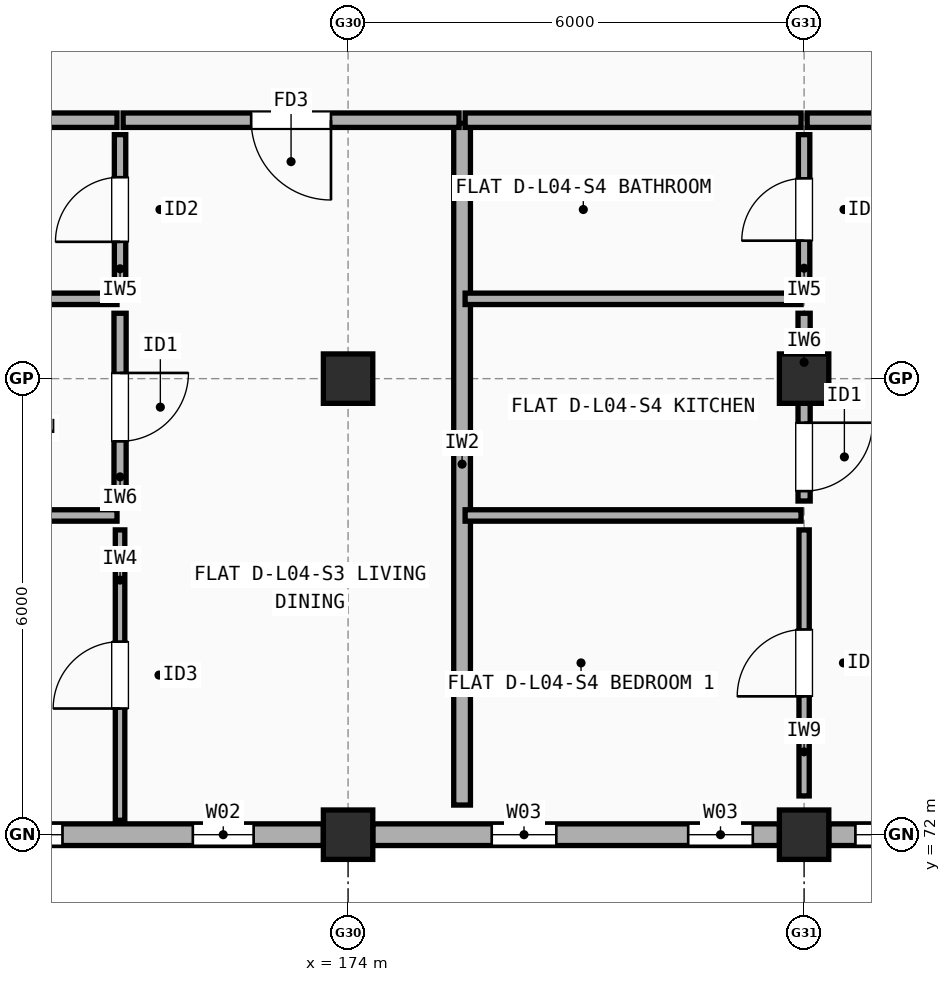
"""IFC4 building model, lengths in metres.
Left out: names, types, materials, properties, quantities, classifications, styles, units other than length and angle.
Written with IfcOpenShell. Run it as: python <this file> out.ifc"""

import sys

from ifc_helpers import new_model, si_unit, direction, frame, frame_2d, origin, origin_2d, place, context, subcontext, project, spatial, rectangle, extrude, element, fill, save


model = new_model("IFC4")
c1 = context("Model", 3, precision=1e-05, world=origin(), true_north=direction((0.0, 1.0)))
c2 = subcontext(c1, "Body", "Model", "MODEL_VIEW")
j1 = project(units=[si_unit("LENGTHUNIT", "METRE"), si_unit("PLANEANGLEUNIT", "RADIAN")], contexts=[c1])
p1 = place(None, origin())
s1 = spatial("IfcSite", under=j1, at=p1, CompositionType="ELEMENT")
p2 = place(p1, origin())
s2 = spatial("IfcBuilding", under=s1, at=p2, CompositionType="ELEMENT")
p3 = place(p2, frame((0.0, 0.0, 14.1)))
s3 = spatial("IfcBuildingStorey", under=s2, at=p3, CompositionType="ELEMENT", Elevation=14.1)
for number, where, z_axis, x_axis in (
    (1, (174.0, 72.0, 0.0), (0.0, 0.0, 1.0), (1.0, 0.0, 0.0)),
    (2, (174.0, 78.0, 0.0), (0.0, 0.0, 1.0), (1.0, 0.0, 0.0)),
    (3, (180.0, 72.0, 0.0), (0.0, 0.0, 1.0), (1.0, 0.0, 0.0)),
    (4, (180.0, 78.0, 0.0), (0.0, 0.0, 1.0), (1.0, 0.0, 0.0)),
):
    element("IfcColumn", number, at=place(p3, frame(where, z_axis=z_axis, x_axis=x_axis)), inside=s3, PredefinedType="COLUMN", context=c2, shape_type="SweptSolid", body=[
        extrude(rectangle(XDim=0.65, YDim=0.65, at=origin_2d()), origin(), (0.0, 0.0, 1.0), 2.95),
    ])
p4 = place(p3, frame((168.325, 72.0, 0.0), z_axis=(0.0, 0.0, 1.0), x_axis=(1.0, 0.0, 0.0)))
e5 = element("IfcWall", 5, at=p4, inside=s3, PredefinedType="STANDARD", context=c2, shape_type="SweptSolid", body=[
    extrude(rectangle(XDim=5.35, YDim=0.285, at=frame_2d((2.675, 0.0))), origin(), (0.0, 0.0, 1.0), 2.432),
])
p5 = place(p4, frame((0.718, 0.0, 0.9)))
e6 = element("IfcOpeningElement", 6, at=p5, cuts=e5, PredefinedType="OPENING", context=c2, shape_type="SweptSolid", body=[
    extrude(rectangle(XDim=1.2, YDim=1.35, at=frame_2d((0.6, 0.675))), frame((0.0, 0.152, 0.0), z_axis=(0.0, -1.0, 0.0), x_axis=(1.0, 0.0, 0.0)), (0.0, 0.0, 1.0), 0.305),
])
p6 = place(p4, frame((3.633, 0.0, 0.9)))
e7 = element("IfcOpeningElement", 7, at=p6, cuts=e5, PredefinedType="OPENING", context=c2, shape_type="SweptSolid", body=[
    extrude(rectangle(XDim=0.8, YDim=1.2, at=frame_2d((0.4, 0.6))), frame((0.0, 0.152, 0.0), z_axis=(0.0, -1.0, 0.0), x_axis=(1.0, 0.0, 0.0)), (0.0, 0.0, 1.0), 0.305),
])
p7 = place(p3, frame((174.325, 72.0, 0.0), z_axis=(0.0, 0.0, 1.0), x_axis=(1.0, 0.0, 0.0)))
e8 = element("IfcWall", 8, at=p7, inside=s3, PredefinedType="STANDARD", context=c2, shape_type="SweptSolid", body=[
    extrude(rectangle(XDim=5.35, YDim=0.285, at=frame_2d((2.675, 0.0))), origin(), (0.0, 0.0, 1.0), 2.432),
])
p8 = place(p7, frame((1.565, 0.0, 0.9)))
e9 = element("IfcOpeningElement", 9, at=p8, cuts=e8, PredefinedType="OPENING", context=c2, shape_type="SweptSolid", body=[
    extrude(rectangle(XDim=0.85, YDim=1.25, at=frame_2d((0.425, 0.625))), frame((0.0, 0.152, 0.0), z_axis=(0.0, -1.0, 0.0), x_axis=(1.0, 0.0, 0.0)), (0.0, 0.0, 1.0), 0.305),
])
p9 = place(p7, frame((4.15, 0.0, 0.9)))
e10 = element("IfcOpeningElement", 10, at=p9, cuts=e8, PredefinedType="OPENING", context=c2, shape_type="SweptSolid", body=[
    extrude(rectangle(XDim=0.85, YDim=1.25, at=frame_2d((0.425, 0.625))), frame((0.0, 0.152, 0.0), z_axis=(0.0, -1.0, 0.0), x_axis=(1.0, 0.0, 0.0)), (0.0, 0.0, 1.0), 0.305),
])
p10 = place(p3, frame((180.325, 72.0, 0.0), z_axis=(0.0, 0.0, 1.0), x_axis=(1.0, 0.0, 0.0)))
e11 = element("IfcWall", 11, at=p10, inside=s3, PredefinedType="STANDARD", context=c2, shape_type="SweptSolid", body=[
    extrude(rectangle(XDim=5.4, YDim=0.285, at=frame_2d((2.7, 0.0))), origin(), (0.0, 0.0, 1.0), 2.432),
])
p11 = place(p10, frame((0.35, 0.0, 0.9)))
e12 = element("IfcOpeningElement", 12, at=p11, cuts=e11, PredefinedType="OPENING", context=c2, shape_type="SweptSolid", body=[
    extrude(rectangle(XDim=0.95, YDim=1.35, at=frame_2d((0.475, 0.675))), frame((0.0, 0.152, 0.0), z_axis=(0.0, -1.0, 0.0), x_axis=(1.0, 0.0, 0.0)), (0.0, 0.0, 1.0), 0.305),
])
p12 = place(p10, frame((4.1, 0.0, 0.9)))
e13 = element("IfcOpeningElement", 13, at=p12, cuts=e11, PredefinedType="OPENING", context=c2, shape_type="SweptSolid", body=[
    extrude(rectangle(XDim=0.95, YDim=1.35, at=frame_2d((0.475, 0.675))), frame((0.0, 0.152, 0.0), z_axis=(0.0, -1.0, 0.0), x_axis=(1.0, 0.0, 0.0)), (0.0, 0.0, 1.0), 0.305),
])
p13 = place(p3, frame((175.5, 72.39, 0.0), z_axis=(0.0, 0.0, 1.0), x_axis=(0.0, 1.0, 0.0)))
e14 = element("IfcWall", 14, at=p13, inside=s3, PredefinedType="SOLIDWALL", context=c2, shape_type="SweptSolid", body=[
    extrude(rectangle(XDim=8.97, YDim=0.22, at=frame_2d((4.485, 0.0))), origin(), (0.0, 0.0, 1.0), 2.432),
])
p14 = place(p3, frame((166.54, 81.4, 0.0), z_axis=(0.0, 0.0, 1.0), x_axis=(1.0, 0.0, 0.0)))
e15 = element("IfcWall", 15, at=p14, inside=s3, PredefinedType="SOLIDWALL", context=c2, shape_type="SweptSolid", body=[
    extrude(rectangle(XDim=4.42, YDim=0.19, at=frame_2d((2.21, 0.0))), origin(), (0.0, 0.0, 1.0), 2.458),
])
p15 = place(p3, frame((171.04, 81.4, 0.0), z_axis=(0.0, 0.0, 1.0), x_axis=(1.0, 0.0, 0.0)))
e16 = element("IfcWall", 16, at=p15, inside=s3, PredefinedType="SOLIDWALL", context=c2, shape_type="SweptSolid", body=[
    extrude(rectangle(XDim=4.42, YDim=0.19, at=frame_2d((2.21, 0.0))), origin(), (0.0, 0.0, 1.0), 2.508),
])
p16 = place(p15, frame((1.685, 0.0, 0.0)))
e17 = element("IfcOpeningElement", 17, at=p16, cuts=e16, PredefinedType="OPENING", context=c2, shape_type="SweptSolid", body=[
    extrude(rectangle(XDim=1.05, YDim=2.15, at=frame_2d((0.525, 1.075))), frame((0.0, 0.105, 0.0), z_axis=(0.0, -1.0, 0.0), x_axis=(1.0, 0.0, 0.0)), (0.0, 0.0, 1.0), 0.21),
])
p17 = place(p3, frame((171.0, 72.19, 0.0), z_axis=(0.0, 0.0, 1.0), x_axis=(0.0, 1.0, 0.0)))
e18 = element("IfcWall", 18, at=p17, inside=s3, PredefinedType="PARTITIONING", context=c2, shape_type="SweptSolid", body=[
    extrude(rectangle(XDim=3.82, YDim=0.125, at=frame_2d((1.91, 0.0))), origin(), (0.0, 0.0, 1.0), 2.95),
])
p18 = place(p17, frame((1.47, 0.0, 0.0)))
e19 = element("IfcOpeningElement", 19, at=p18, cuts=e18, PredefinedType="OPENING", context=c2, shape_type="SweptSolid", body=[
    extrude(rectangle(XDim=0.88, YDim=2.1, at=frame_2d((0.44, 1.05))), frame((0.0, 0.073, 0.0), z_axis=(0.0, -1.0, 0.0), x_axis=(1.0, 0.0, 0.0)), (0.0, 0.0, 1.0), 0.145),
])
p19 = place(p3, frame((171.0, 76.39, 0.0), z_axis=(0.0, 0.0, 1.0), x_axis=(0.0, 1.0, 0.0)))
e20 = element("IfcWall", 20, at=p19, inside=s3, PredefinedType="PLUMBINGWALL", context=c2, shape_type="SweptSolid", body=[
    extrude(rectangle(XDim=2.47, YDim=0.16, at=frame_2d((1.235, 0.0))), origin(), (0.0, 0.0, 1.0), 2.432),
])
p20 = place(p19, frame((0.785, 0.0, 0.0)))
e21 = element("IfcOpeningElement", 21, at=p20, cuts=e20, PredefinedType="OPENING", context=c2, shape_type="SweptSolid", body=[
    extrude(rectangle(XDim=0.9, YDim=2.1, at=frame_2d((0.45, 1.05))), frame((0.0, 0.09, 0.0), z_axis=(0.0, -1.0, 0.0), x_axis=(1.0, 0.0, 0.0)), (0.0, 0.0, 1.0), 0.18),
])
p21 = place(p3, frame((171.0, 79.24, 0.0), z_axis=(0.0, 0.0, 1.0), x_axis=(0.0, 1.0, 0.0)))
e22 = element("IfcWall", 22, at=p21, inside=s3, PredefinedType="PARTITIONING", context=c2, shape_type="SweptSolid", body=[
    extrude(rectangle(XDim=1.97, YDim=0.15, at=frame_2d((0.985, 0.0))), origin(), (0.0, 0.0, 1.0), 2.95),
])
p22 = place(p21, frame((0.56, 0.0, 0.0)))
e23 = element("IfcOpeningElement", 23, at=p22, cuts=e22, PredefinedType="OPENING", context=c2, shape_type="SweptSolid", body=[
    extrude(rectangle(XDim=0.85, YDim=2.1, at=frame_2d((0.425, 1.05))), frame((0.0, 0.085, 0.0), z_axis=(0.0, -1.0, 0.0), x_axis=(1.0, 0.0, 0.0)), (0.0, 0.0, 1.0), 0.17),
])
p23 = place(p3, frame((166.54, 76.2, 0.0), z_axis=(0.0, 0.0, 1.0), x_axis=(1.0, 0.0, 0.0)))
e24 = element("IfcWall", 24, at=p23, inside=s3, PredefinedType="PARTITIONING", context=c2, shape_type="SweptSolid", body=[
    extrude(rectangle(XDim=4.42, YDim=0.15, at=frame_2d((2.21, 0.0))), origin(), (0.0, 0.0, 1.0), 2.508),
])
p24 = place(p3, frame((166.54, 79.05, 0.0), z_axis=(0.0, 0.0, 1.0), x_axis=(1.0, 0.0, 0.0)))
e25 = element("IfcWall", 25, at=p24, inside=s3, PredefinedType="PARTITIONING", context=c2, shape_type="SweptSolid", body=[
    extrude(rectangle(XDim=4.42, YDim=0.15, at=frame_2d((2.21, 0.0))), origin(), (0.0, 0.0, 1.0), 2.458),
])
p25 = place(p3, frame((175.54, 81.4, 0.0), z_axis=(0.0, 0.0, 1.0), x_axis=(1.0, 0.0, 0.0)))
e26 = element("IfcWall", 26, at=p25, inside=s3, PredefinedType="SOLIDWALL", context=c2, shape_type="SweptSolid", body=[
    extrude(rectangle(XDim=4.42, YDim=0.19, at=frame_2d((2.21, 0.0))), origin(), (0.0, 0.0, 1.0), 2.458),
])
p26 = place(p3, frame((180.04, 81.4, 0.0), z_axis=(0.0, 0.0, 1.0), x_axis=(1.0, 0.0, 0.0)))
e27 = element("IfcWall", 27, at=p26, inside=s3, PredefinedType="SOLIDWALL", context=c2, shape_type="SweptSolid", body=[
    extrude(rectangle(XDim=5.92, YDim=0.19, at=frame_2d((2.96, 0.0))), origin(), (0.0, 0.0, 1.0), 2.432),
])
p27 = place(p26, frame((2.46, 0.0, 0.0)))
e28 = element("IfcOpeningElement", 28, at=p27, cuts=e27, PredefinedType="OPENING", context=c2, shape_type="SweptSolid", body=[
    extrude(rectangle(XDim=1.0, YDim=2.15, at=frame_2d((0.5, 1.075))), frame((0.0, 0.105, 0.0), z_axis=(0.0, -1.0, 0.0), x_axis=(1.0, 0.0, 0.0)), (0.0, 0.0, 1.0), 0.21),
])
p28 = place(p3, frame((180.0, 72.51, 0.0), z_axis=(0.0, 0.0, 1.0), x_axis=(0.0, 1.0, 0.0)))
e29 = element("IfcWall", 29, at=p28, inside=s3, PredefinedType="PARTITIONING", context=c2, shape_type="SweptSolid", body=[
    extrude(rectangle(XDim=3.5, YDim=0.135, at=frame_2d((1.75, 0.0))), origin(), (0.0, 0.0, 1.0), 2.508),
])
p29 = place(p28, frame((1.31, 0.0, 0.0)))
e30 = element("IfcOpeningElement", 30, at=p29, cuts=e29, PredefinedType="OPENING", context=c2, shape_type="SweptSolid", body=[
    extrude(rectangle(XDim=0.88, YDim=2.1, at=frame_2d((0.44, 1.05))), frame((0.0, 0.077, 0.0), z_axis=(0.0, -1.0, 0.0), x_axis=(1.0, 0.0, 0.0)), (0.0, 0.0, 1.0), 0.155),
])
p30 = place(p3, frame((180.0, 76.39, 0.0), z_axis=(0.0, 0.0, 1.0), x_axis=(0.0, 1.0, 0.0)))
e31 = element("IfcWall", 31, at=p30, inside=s3, PredefinedType="PLUMBINGWALL", context=c2, shape_type="SweptSolid", body=[
    extrude(rectangle(XDim=2.47, YDim=0.16, at=frame_2d((1.235, 0.0))), origin(), (0.0, 0.0, 1.0), 2.458),
])
p31 = place(p30, frame((0.13, 0.0, 0.0)))
e32 = element("IfcOpeningElement", 32, at=p31, cuts=e31, PredefinedType="OPENING", context=c2, shape_type="SweptSolid", body=[
    extrude(rectangle(XDim=0.9, YDim=2.1, at=frame_2d((0.45, 1.05))), frame((0.0, 0.09, 0.0), z_axis=(0.0, -1.0, 0.0), x_axis=(1.0, 0.0, 0.0)), (0.0, 0.0, 1.0), 0.18),
])
p32 = place(p3, frame((180.0, 79.24, 0.0), z_axis=(0.0, 0.0, 1.0), x_axis=(0.0, 1.0, 0.0)))
e33 = element("IfcWall", 33, at=p32, inside=s3, PredefinedType="PARTITIONING", context=c2, shape_type="SweptSolid", body=[
    extrude(rectangle(XDim=1.97, YDim=0.15, at=frame_2d((0.985, 0.0))), origin(), (0.0, 0.0, 1.0), 2.458),
])
p33 = place(p32, frame((0.575, 0.0, 0.0)))
e34 = element("IfcOpeningElement", 34, at=p33, cuts=e33, PredefinedType="OPENING", context=c2, shape_type="SweptSolid", body=[
    extrude(rectangle(XDim=0.82, YDim=2.08, at=frame_2d((0.41, 1.04))), frame((0.0, 0.085, 0.0), z_axis=(0.0, -1.0, 0.0), x_axis=(1.0, 0.0, 0.0)), (0.0, 0.0, 1.0), 0.17),
])
p34 = place(p3, frame((175.54, 76.2, 0.0), z_axis=(0.0, 0.0, 1.0), x_axis=(1.0, 0.0, 0.0)))
e35 = element("IfcWall", 35, at=p34, inside=s3, PredefinedType="PARTITIONING", context=c2, shape_type="SweptSolid", body=[
    extrude(rectangle(XDim=4.42, YDim=0.15, at=frame_2d((2.21, 0.0))), origin(), (0.0, 0.0, 1.0), 2.508),
])
p35 = place(p3, frame((175.54, 79.05, 0.0), z_axis=(0.0, 0.0, 1.0), x_axis=(1.0, 0.0, 0.0)))
e36 = element("IfcWall", 36, at=p35, inside=s3, PredefinedType="PARTITIONING", context=c2, shape_type="SweptSolid", body=[
    extrude(rectangle(XDim=4.42, YDim=0.15, at=frame_2d((2.21, 0.0))), origin(), (0.0, 0.0, 1.0), 2.458),
])
p36 = place(p5, origin())
e37 = element("IfcWindow", 37, at=p36, inside=s3, PartitioningType="SINGLE_PANEL", PredefinedType="WINDOW", context=c2, shape_type="SweptSolid", body=[
    extrude(rectangle(XDim=1.2, YDim=1.35, at=frame_2d((0.6, 0.675))), frame((0.0, 0.03, 0.0), z_axis=(0.0, -1.0, 0.0), x_axis=(1.0, 0.0, 0.0)), (0.0, 0.0, 1.0), 0.06),
])
fill(e6, e37)
p37 = place(p6, origin())
e38 = element("IfcWindow", 38, at=p37, inside=s3, PartitioningType="SINGLE_PANEL", PredefinedType="WINDOW", context=c2, shape_type="SweptSolid", body=[
    extrude(rectangle(XDim=0.8, YDim=1.2, at=frame_2d((0.4, 0.6))), frame((0.0, 0.03, 0.0), z_axis=(0.0, -1.0, 0.0), x_axis=(1.0, 0.0, 0.0)), (0.0, 0.0, 1.0), 0.06),
])
fill(e7, e38)
p38 = place(p8, origin())
e39 = element("IfcWindow", 39, at=p38, inside=s3, PartitioningType="SINGLE_PANEL", PredefinedType="WINDOW", context=c2, shape_type="SweptSolid", body=[
    extrude(rectangle(XDim=0.85, YDim=1.25, at=frame_2d((0.425, 0.625))), frame((0.0, 0.03, 0.0), z_axis=(0.0, -1.0, 0.0), x_axis=(1.0, 0.0, 0.0)), (0.0, 0.0, 1.0), 0.06),
])
fill(e9, e39)
p39 = place(p9, origin())
e40 = element("IfcWindow", 40, at=p39, inside=s3, PartitioningType="SINGLE_PANEL", PredefinedType="WINDOW", context=c2, shape_type="SweptSolid", body=[
    extrude(rectangle(XDim=0.85, YDim=1.25, at=frame_2d((0.425, 0.625))), frame((0.0, 0.03, 0.0), z_axis=(0.0, -1.0, 0.0), x_axis=(1.0, 0.0, 0.0)), (0.0, 0.0, 1.0), 0.06),
])
fill(e10, e40)
p40 = place(p11, origin())
e41 = element("IfcWindow", 41, at=p40, inside=s3, PartitioningType="SINGLE_PANEL", PredefinedType="WINDOW", context=c2, shape_type="SweptSolid", body=[
    extrude(rectangle(XDim=0.95, YDim=1.35, at=frame_2d((0.475, 0.675))), frame((0.0, 0.03, 0.0), z_axis=(0.0, -1.0, 0.0), x_axis=(1.0, 0.0, 0.0)), (0.0, 0.0, 1.0), 0.06),
])
fill(e12, e41)
p41 = place(p16, origin())
e42 = element("IfcDoor", 42, at=p41, inside=s3, OperationType="SINGLE_SWING_RIGHT", PredefinedType="DOOR", context=c2, shape_type="SweptSolid", body=[
    extrude(rectangle(XDim=1.05, YDim=2.15, at=frame_2d((0.525, 1.075))), frame((0.0, 0.025, 0.0), z_axis=(0.0, -1.0, 0.0), x_axis=(1.0, 0.0, 0.0)), (0.0, 0.0, 1.0), 0.05),
])
fill(e17, e42)
p42 = place(p18, origin())
e43 = element("IfcDoor", 43, at=p42, inside=s3, OperationType="SINGLE_SWING_LEFT", PredefinedType="DOOR", context=c2, shape_type="SweptSolid", body=[
    extrude(rectangle(XDim=0.88, YDim=2.1, at=frame_2d((0.44, 1.05))), frame((0.0, 0.025, 0.0), z_axis=(0.0, -1.0, 0.0), x_axis=(1.0, 0.0, 0.0)), (0.0, 0.0, 1.0), 0.05),
])
fill(e19, e43)
p43 = place(p20, origin())
e44 = element("IfcDoor", 44, at=p43, inside=s3, OperationType="SINGLE_SWING_RIGHT", PredefinedType="DOOR", context=c2, shape_type="SweptSolid", body=[
    extrude(rectangle(XDim=0.9, YDim=2.1, at=frame_2d((0.45, 1.05))), frame((0.0, 0.025, 0.0), z_axis=(0.0, -1.0, 0.0), x_axis=(1.0, 0.0, 0.0)), (0.0, 0.0, 1.0), 0.05),
])
fill(e21, e44)
p44 = place(p22, origin())
e45 = element("IfcDoor", 45, at=p44, inside=s3, OperationType="SINGLE_SWING_LEFT", PredefinedType="DOOR", context=c2, shape_type="SweptSolid", body=[
    extrude(rectangle(XDim=0.85, YDim=2.1, at=frame_2d((0.425, 1.05))), frame((0.0, 0.025, 0.0), z_axis=(0.0, -1.0, 0.0), x_axis=(1.0, 0.0, 0.0)), (0.0, 0.0, 1.0), 0.05),
])
fill(e23, e45)
p45 = place(p29, origin())
e46 = element("IfcDoor", 46, at=p45, inside=s3, OperationType="SINGLE_SWING_LEFT", PredefinedType="DOOR", context=c2, shape_type="SweptSolid", body=[
    extrude(rectangle(XDim=0.88, YDim=2.1, at=frame_2d((0.44, 1.05))), frame((0.0, 0.025, 0.0), z_axis=(0.0, -1.0, 0.0), x_axis=(1.0, 0.0, 0.0)), (0.0, 0.0, 1.0), 0.05),
])
fill(e30, e46)
p46 = place(p31, origin())
e47 = element("IfcDoor", 47, at=p46, inside=s3, OperationType="SINGLE_SWING_RIGHT", PredefinedType="DOOR", context=c2, shape_type="SweptSolid", body=[
    extrude(rectangle(XDim=0.9, YDim=2.1, at=frame_2d((0.45, 1.05))), frame((0.0, 0.025, 0.0), z_axis=(0.0, -1.0, 0.0), x_axis=(1.0, 0.0, 0.0)), (0.0, 0.0, 1.0), 0.05),
])
fill(e32, e47)
p47 = place(p33, origin())
e48 = element("IfcDoor", 48, at=p47, inside=s3, OperationType="SINGLE_SWING_LEFT", PredefinedType="DOOR", context=c2, shape_type="SweptSolid", body=[
    extrude(rectangle(XDim=0.82, YDim=2.08, at=frame_2d((0.41, 1.04))), frame((0.0, 0.025, 0.0), z_axis=(0.0, -1.0, 0.0), x_axis=(1.0, 0.0, 0.0)), (0.0, 0.0, 1.0), 0.05),
])
fill(e34, e48)
save(model, sys.argv[1])
